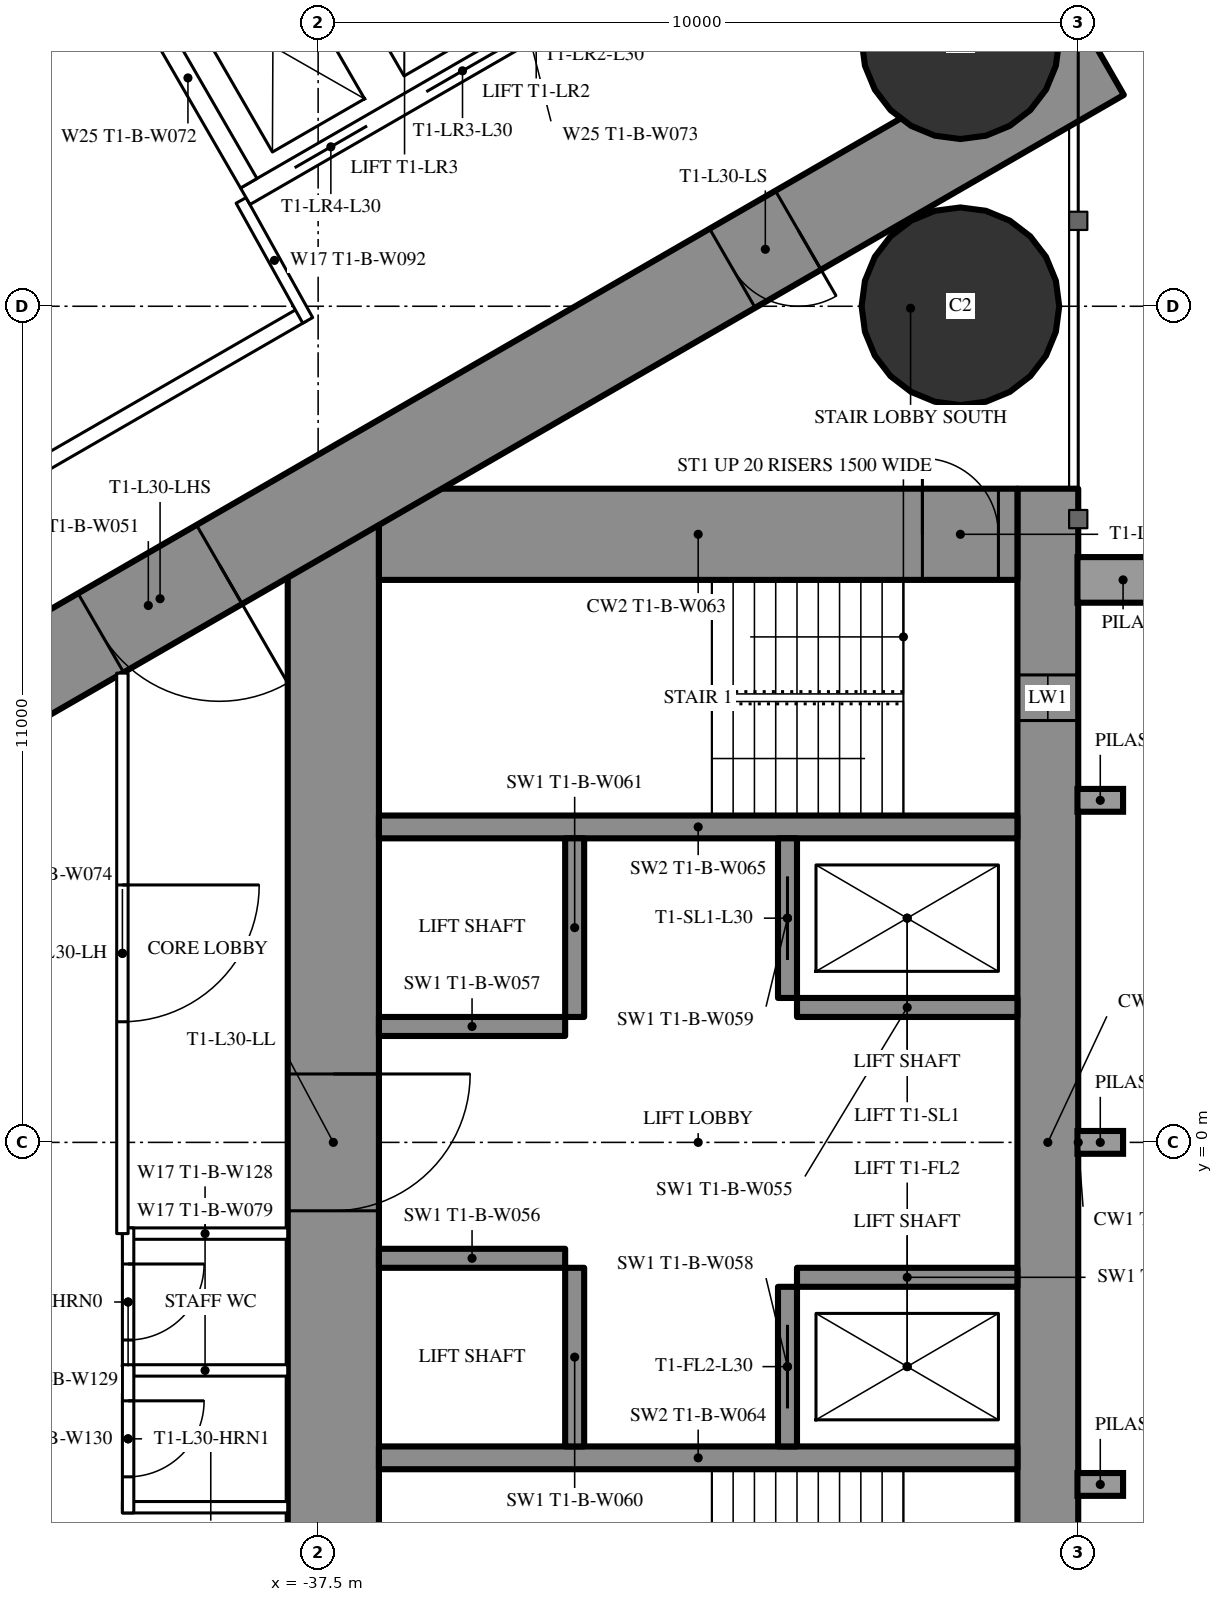
"""IFC4 building model, lengths in metres.
Left out: names, types, materials, properties, quantities, classifications, styles, units other than length and angle.
Written with IfcOpenShell. Run it as: python <this file> out.ifc"""

import sys

from ifc_helpers import new_model, si_unit, direction, frame, frame_2d, origin, origin_2d, place, context, subcontext, project, spatial, rectangle, hollow_circle, extrude, element, fill, save


model = new_model("IFC4")
c1 = context("Model", 3, precision=1e-05, world=origin(), true_north=direction((0.0, 1.0)))
c2 = subcontext(c1, "Body", "Model", "MODEL_VIEW")
j1 = project(units=[si_unit("LENGTHUNIT", "METRE"), si_unit("PLANEANGLEUNIT", "RADIAN")], contexts=[c1])
p1 = place(None, origin())
s1 = spatial("IfcSite", under=j1, at=p1, CompositionType="ELEMENT")
p2 = place(p1, origin())
s2 = spatial("IfcBuilding", under=s1, at=p2, CompositionType="ELEMENT")
p3 = place(p2, frame((0.0, 0.0, 115.1)))
s3 = spatial("IfcBuildingStorey", under=s2, at=p3, CompositionType="ELEMENT", Elevation=115.1)
for number, where, z_axis, x_axis in (
    (1, (-29.05, 11.0, 0.0), (0.0, 0.0, 1.0), (1.0, 0.0, 0.0)),
    (2, (-29.05, 14.5, 0.0), (0.0, 0.0, 1.0), (1.0, 0.0, 0.0)),
):
    element("IfcColumn", number, at=place(p3, frame(where, z_axis=z_axis, x_axis=x_axis)), inside=s3, PredefinedType="COLUMN", context=c2, shape_type="SweptSolid", body=[
        extrude(hollow_circle(Radius=1.3, WallThickness=0.1, at=origin_2d()), origin(), (0.0, 0.0, 1.0), 3.5),
    ])
p4 = place(p3, frame((-27.9, 8.6, 0.0), z_axis=(0.0, 0.0, 1.0), x_axis=(0.0, -1.0, 0.0)))
e3 = element("IfcWall", 3, at=p4, inside=s3, PredefinedType="SHEAR", context=c2, shape_type="SweptSolid", body=[
    extrude(rectangle(XDim=17.2, YDim=0.8, at=frame_2d((8.6, 0.0))), origin(), (0.0, 0.0, 1.0), 3.5),
])
p5 = place(p4, frame((2.45, 0.0, 0.6)))
e4 = element("IfcOpeningElement", 4, at=p5, cuts=e3, PredefinedType="OPENING", context=c2, shape_type="SweptSolid", body=[
    extrude(rectangle(XDim=0.6, YDim=2.1, at=frame_2d((0.3, 1.05))), frame((0.0, 0.41, 0.0), z_axis=(0.0, -1.0, 0.0), x_axis=(1.0, 0.0, 0.0)), (0.0, 0.0, 1.0), 0.82),
])
p6 = place(p4, frame((14.15, 0.0, 0.6)))
e5 = element("IfcOpeningElement", 5, at=p6, cuts=e3, PredefinedType="OPENING", context=c2, shape_type="SweptSolid", body=[
    extrude(rectangle(XDim=0.6, YDim=2.1, at=frame_2d((0.3, 1.05))), frame((0.0, 0.41, 0.0), z_axis=(0.0, -1.0, 0.0), x_axis=(1.0, 0.0, 0.0)), (0.0, 0.0, 1.0), 0.82),
])
p7 = place(p3, frame((-37.3, 8.6, 0.0), z_axis=(0.0, 0.0, 1.0), x_axis=(0.0, -1.0, 0.0)))
e6 = element("IfcWall", 6, at=p7, inside=s3, PredefinedType="SHEAR", context=c2, shape_type="SweptSolid", body=[
    extrude(rectangle(XDim=17.2, YDim=1.2, at=frame_2d((8.6, 0.0))), origin(), (0.0, 0.0, 1.0), 3.5),
])
p8 = place(p7, frame((7.7, 0.0, 0.0)))
e7 = element("IfcOpeningElement", 7, at=p8, cuts=e6, PredefinedType="OPENING", context=c2, shape_type="SweptSolid", body=[
    extrude(rectangle(XDim=1.8, YDim=2.2, at=frame_2d((0.9, 1.1))), frame((0.0, 0.61, 0.0), z_axis=(0.0, -1.0, 0.0), x_axis=(1.0, 0.0, 0.0)), (0.0, 0.0, 1.0), 1.22),
])
p9 = place(p3, frame((-28.3, 8.0, 0.0), z_axis=(0.0, 0.0, 1.0), x_axis=(-1.0, 0.0, 0.0)))
e8 = element("IfcWall", 8, at=p9, inside=s3, PredefinedType="SHEAR", context=c2, shape_type="SweptSolid", body=[
    extrude(rectangle(XDim=8.4, YDim=1.2, at=frame_2d((4.2, 0.0))), origin(), (0.0, 0.0, 1.0), 3.5),
])
p10 = place(p9, frame((0.25, 0.0, 0.0)))
e9 = element("IfcOpeningElement", 9, at=p10, cuts=e8, PredefinedType="OPENING", context=c2, shape_type="SweptSolid", body=[
    extrude(rectangle(XDim=1.0, YDim=2.2, at=frame_2d((0.5, 1.1))), frame((0.0, 0.61, 0.0), z_axis=(0.0, -1.0, 0.0), x_axis=(1.0, 0.0, 0.0)), (0.0, 0.0, 1.0), 1.22),
])
for number, where, z_axis, x_axis in (
    (10, (-28.3, 4.15, 0.0), (0.0, 0.0, 1.0), (-1.0, 0.0, 0.0)),
    (11, (-28.3, -4.15, 0.0), (0.0, 0.0, 1.0), (-1.0, 0.0, 0.0)),
):
    element("IfcWall", number, at=place(p3, frame(where, z_axis=z_axis, x_axis=x_axis)), inside=s3, PredefinedType="SHEAR", context=c2, shape_type="SweptSolid", body=[
        extrude(rectangle(XDim=8.4, YDim=0.3, at=frame_2d((4.2, 0.0))), origin(), (0.0, 0.0, 1.0), 3.5),
    ])
p11 = place(p3, frame((-31.325, 4.0, 0.0), z_axis=(0.0, 0.0, 1.0), x_axis=(0.0, -1.0, 0.0)))
e12 = element("IfcWall", 12, at=p11, inside=s3, PredefinedType="SHEAR", context=c2, shape_type="SweptSolid", body=[
    extrude(rectangle(XDim=2.1, YDim=0.25, at=frame_2d((1.05, 0.0))), origin(), (0.0, 0.0, 1.0), 3.5),
])
p12 = place(p11, frame((0.5, 0.0, 0.0)))
e13 = element("IfcOpeningElement", 13, at=p12, cuts=e12, PredefinedType="OPENING", context=c2, shape_type="SweptSolid", body=[
    extrude(rectangle(XDim=1.1, YDim=2.2, at=frame_2d((0.55, 1.1))), frame((0.0, 0.135, 0.0), z_axis=(0.0, -1.0, 0.0), x_axis=(1.0, 0.0, 0.0)), (0.0, 0.0, 1.0), 0.27),
])
p13 = place(p3, frame((-34.125, 4.0, 0.0), z_axis=(0.0, 0.0, 1.0), x_axis=(0.0, -1.0, 0.0)))
e14 = element("IfcWall", 14, at=p13, inside=s3, PredefinedType="SHEAR", context=c2, shape_type="SweptSolid", body=[
    extrude(rectangle(XDim=2.35, YDim=0.25, at=frame_2d((1.175, 0.0))), origin(), (0.0, 0.0, 1.0), 3.5),
])
p14 = place(p3, frame((-28.3, 1.775, 0.0), z_axis=(0.0, 0.0, 1.0), x_axis=(-1.0, 0.0, 0.0)))
e15 = element("IfcWall", 15, at=p14, inside=s3, PredefinedType="SHEAR", context=c2, shape_type="SweptSolid", body=[
    extrude(rectangle(XDim=2.9, YDim=0.25, at=frame_2d((1.45, 0.0))), origin(), (0.0, 0.0, 1.0), 3.5),
])
p15 = place(p3, frame((-34.25, 1.525, 0.0), z_axis=(0.0, 0.0, 1.0), x_axis=(-1.0, 0.0, 0.0)))
e16 = element("IfcWall", 16, at=p15, inside=s3, PredefinedType="SHEAR", context=c2, shape_type="SweptSolid", body=[
    extrude(rectangle(XDim=2.45, YDim=0.25, at=frame_2d((1.225, 0.0))), origin(), (0.0, 0.0, 1.0), 3.5),
])
p16 = place(p3, frame((-31.325, -1.9, 0.0), z_axis=(0.0, 0.0, 1.0), x_axis=(0.0, -1.0, 0.0)))
e17 = element("IfcWall", 17, at=p16, inside=s3, PredefinedType="SHEAR", context=c2, shape_type="SweptSolid", body=[
    extrude(rectangle(XDim=2.1, YDim=0.25, at=frame_2d((1.05, 0.0))), origin(), (0.0, 0.0, 1.0), 3.5),
])
p17 = place(p16, frame((0.5, 0.0, 0.0)))
e18 = element("IfcOpeningElement", 18, at=p17, cuts=e17, PredefinedType="OPENING", context=c2, shape_type="SweptSolid", body=[
    extrude(rectangle(XDim=1.1, YDim=2.2, at=frame_2d((0.55, 1.1))), frame((0.0, 0.135, 0.0), z_axis=(0.0, -1.0, 0.0), x_axis=(1.0, 0.0, 0.0)), (0.0, 0.0, 1.0), 0.27),
])
p18 = place(p3, frame((-34.125, -1.65, 0.0), z_axis=(0.0, 0.0, 1.0), x_axis=(0.0, -1.0, 0.0)))
e19 = element("IfcWall", 19, at=p18, inside=s3, PredefinedType="SHEAR", context=c2, shape_type="SweptSolid", body=[
    extrude(rectangle(XDim=2.35, YDim=0.25, at=frame_2d((1.175, 0.0))), origin(), (0.0, 0.0, 1.0), 3.5),
])
p19 = place(p3, frame((-28.3, -1.775, 0.0), z_axis=(0.0, 0.0, 1.0), x_axis=(-1.0, 0.0, 0.0)))
e20 = element("IfcWall", 20, at=p19, inside=s3, PredefinedType="SHEAR", context=c2, shape_type="SweptSolid", body=[
    extrude(rectangle(XDim=2.9, YDim=0.25, at=frame_2d((1.45, 0.0))), origin(), (0.0, 0.0, 1.0), 3.5),
])
p20 = place(p3, frame((-34.25, -1.525, 0.0), z_axis=(0.0, 0.0, 1.0), x_axis=(-1.0, 0.0, 0.0)))
e21 = element("IfcWall", 21, at=p20, inside=s3, PredefinedType="SHEAR", context=c2, shape_type="SweptSolid", body=[
    extrude(rectangle(XDim=2.45, YDim=0.25, at=frame_2d((1.225, 0.0))), origin(), (0.0, 0.0, 1.0), 3.5),
])
p21 = place(p3, frame((-27.2, 14.3, 0.0), z_axis=(0.0, 0.0, 1.0), x_axis=(-0.866026593062, -0.499997940104, 0.0)))
e22 = element("IfcWall", 22, at=p21, inside=s3, PredefinedType="SHEAR", context=c2, shape_type="SweptSolid", body=[
    extrude(rectangle(XDim=28.946, YDim=1.2, at=frame_2d((14.473, 0.0))), origin(), (0.0, 0.0, 1.0), 3.5),
])
p22 = place(p21, frame((4.6, 0.0, 0.0)))
e23 = element("IfcOpeningElement", 23, at=p22, cuts=e22, PredefinedType="OPENING", context=c2, shape_type="SweptSolid", body=[
    extrude(rectangle(XDim=1.0, YDim=2.2, at=frame_2d((0.5, 1.1))), frame((0.0, 0.61, 0.0), z_axis=(0.0, -1.0, 0.0), x_axis=(1.0, 0.0, 0.0)), (0.0, 0.0, 1.0), 1.22),
])
p23 = place(p21, frame((13.395, 0.0, 0.0)))
e24 = element("IfcOpeningElement", 24, at=p23, cuts=e22, PredefinedType="OPENING", context=c2, shape_type="SweptSolid", body=[
    extrude(rectangle(XDim=1.8, YDim=2.2, at=frame_2d((0.9, 1.1))), frame((0.0, 0.61, 0.0), z_axis=(0.0, -1.0, 0.0), x_axis=(1.0, 0.0, 0.0)), (0.0, 0.0, 1.0), 1.22),
])
p24 = place(p3, frame((-27.2, -14.3, 0.0), z_axis=(0.0, 0.0, 1.0), x_axis=(-0.866024021859, 0.500002393557, 0.0)))
e25 = element("IfcWall", 25, at=p24, inside=s3, PredefinedType="SHEAR", context=c2, shape_type="SweptSolid", body=[
    extrude(rectangle(XDim=27.907, YDim=1.2, at=frame_2d((13.954, 0.0))), origin(), (0.0, 0.0, 1.0), 3.5),
])
p25 = place(p24, frame((4.6, 0.0, 0.0)))
e26 = element("IfcOpeningElement", 26, at=p25, cuts=e25, PredefinedType="OPENING", context=c2, shape_type="SweptSolid", body=[
    extrude(rectangle(XDim=1.0, YDim=2.2, at=frame_2d((0.5, 1.1))), frame((0.0, 0.61, 0.0), z_axis=(0.0, -1.0, 0.0), x_axis=(1.0, 0.0, 0.0)), (0.0, 0.0, 1.0), 1.22),
])
p26 = place(p24, frame((13.395, 0.0, 0.0)))
e27 = element("IfcOpeningElement", 27, at=p26, cuts=e25, PredefinedType="OPENING", context=c2, shape_type="SweptSolid", body=[
    extrude(rectangle(XDim=1.8, YDim=2.2, at=frame_2d((0.9, 1.1))), frame((0.0, 0.61, 0.0), z_axis=(0.0, -1.0, 0.0), x_axis=(1.0, 0.0, 0.0)), (0.0, 0.0, 1.0), 1.22),
])
p27 = place(p3, frame((-37.7, 10.894, 0.0), z_axis=(0.0, 0.0, 1.0), x_axis=(-0.866027905338, -0.499995667157, 0.0)))
e28 = element("IfcWall", 28, at=p27, inside=s3, PredefinedType="PARTITIONING", context=c2, shape_type="SweptSolid", body=[
    extrude(rectangle(XDim=21.787, YDim=0.2, at=frame_2d((10.894, 0.0))), origin(), (0.0, 0.0, 1.0), 3.25),
])
p28 = place(p27, frame((11.23, 0.0, 0.0)))
e29 = element("IfcOpeningElement", 29, at=p28, cuts=e28, PredefinedType="OPENING", context=c2, shape_type="SweptSolid", body=[
    extrude(rectangle(XDim=0.95, YDim=2.2, at=frame_2d((0.475, 1.1))), frame((0.0, 0.11, 0.0), z_axis=(0.0, -1.0, 0.0), x_axis=(1.0, 0.0, 0.0)), (0.0, 0.0, 1.0), 0.22),
])
p29 = place(p27, frame((9.531, 0.0, 0.0)))
e30 = element("IfcOpeningElement", 30, at=p29, cuts=e28, PredefinedType="OPENING", context=c2, shape_type="SweptSolid", body=[
    extrude(rectangle(XDim=0.95, YDim=2.2, at=frame_2d((0.475, 1.1))), frame((0.0, 0.11, 0.0), z_axis=(0.0, -1.0, 0.0), x_axis=(1.0, 0.0, 0.0)), (0.0, 0.0, 1.0), 0.22),
])
p30 = place(p3, frame((-38.513, 12.392, 0.0), z_axis=(0.0, 0.0, 1.0), x_axis=(0.485585508183, -0.874189175317, 0.0)))
e31 = element("IfcWall", 31, at=p30, inside=s3, PredefinedType="PARTITIONING", context=c2, shape_type="SweptSolid", body=[
    extrude(rectangle(XDim=1.805, YDim=0.15, at=frame_2d((0.902, 0.0))), origin(), (0.0, 0.0, 1.0), 3.25),
])
for number, where, z_axis, x_axis in (
    (32, (-37.9, -1.2, 0.0), (0.0, 0.0, 1.0), (-1.0, 0.0, 0.0)),
    (33, (-37.9, -3.0, 0.0), (0.0, 0.0, 1.0), (-1.0, 0.0, 0.0)),
    (34, (-37.9, -4.8, 0.0), (0.0, 0.0, 1.0), (-1.0, 0.0, 0.0)),
):
    element("IfcWall", number, at=place(p3, frame(where, z_axis=z_axis, x_axis=x_axis)), inside=s3, PredefinedType="PARTITIONING", context=c2, shape_type="SweptSolid", body=[
        extrude(rectangle(XDim=2.175, YDim=0.15, at=frame_2d((1.087, 0.0))), origin(), (0.0, 0.0, 1.0), 3.25),
    ])
p31 = place(p3, frame((-40.0, -1.125, 0.0), z_axis=(0.0, 0.0, 1.0), x_axis=(0.0, -1.0, 0.0)))
e35 = element("IfcWall", 35, at=p31, inside=s3, PredefinedType="PARTITIONING", context=c2, shape_type="SweptSolid", body=[
    extrude(rectangle(XDim=1.95, YDim=0.15, at=frame_2d((0.975, 0.0))), origin(), (0.0, 0.0, 1.0), 3.25),
])
p32 = place(p31, frame((0.475, 0.0, 0.0)))
e36 = element("IfcOpeningElement", 36, at=p32, cuts=e35, PredefinedType="OPENING", context=c2, shape_type="SweptSolid", body=[
    extrude(rectangle(XDim=1.0, YDim=2.2, at=frame_2d((0.5, 1.1))), frame((0.0, 0.085, 0.0), z_axis=(0.0, -1.0, 0.0), x_axis=(1.0, 0.0, 0.0)), (0.0, 0.0, 1.0), 0.17),
])
p33 = place(p3, frame((-40.0, -2.925, 0.0), z_axis=(0.0, 0.0, 1.0), x_axis=(0.0, -1.0, 0.0)))
e37 = element("IfcWall", 37, at=p33, inside=s3, PredefinedType="PARTITIONING", context=c2, shape_type="SweptSolid", body=[
    extrude(rectangle(XDim=1.95, YDim=0.15, at=frame_2d((0.975, 0.0))), origin(), (0.0, 0.0, 1.0), 3.25),
])
p34 = place(p33, frame((0.475, 0.0, 0.0)))
e38 = element("IfcOpeningElement", 38, at=p34, cuts=e37, PredefinedType="OPENING", context=c2, shape_type="SweptSolid", body=[
    extrude(rectangle(XDim=1.0, YDim=2.2, at=frame_2d((0.5, 1.1))), frame((0.0, 0.085, 0.0), z_axis=(0.0, -1.0, 0.0), x_axis=(1.0, 0.0, 0.0)), (0.0, 0.0, 1.0), 0.17),
])
p35 = place(p3, frame((-40.075, 6.174, 0.0), z_axis=(0.0, 0.0, 1.0), x_axis=(0.0, -1.0, 0.0)))
e39 = element("IfcWall", 39, at=p35, inside=s3, PredefinedType="PARTITIONING", context=c2, shape_type="SweptSolid", body=[
    extrude(rectangle(XDim=7.374, YDim=0.15, at=frame_2d((3.687, 0.0))), origin(), (0.0, 0.0, 1.0), 3.25),
])
p36 = place(p35, frame((2.787, 0.0, 0.0)))
e40 = element("IfcOpeningElement", 40, at=p36, cuts=e39, PredefinedType="OPENING", context=c2, shape_type="SweptSolid", body=[
    extrude(rectangle(XDim=1.8, YDim=2.2, at=frame_2d((0.9, 1.1))), frame((0.0, 0.085, 0.0), z_axis=(0.0, -1.0, 0.0), x_axis=(1.0, 0.0, 0.0)), (0.0, 0.0, 1.0), 0.17),
])
p37 = place(p3, frame((-31.01, 16.747, 0.0), z_axis=(0.0, 0.0, 1.0), x_axis=(-0.866028165386, -0.499995216735, 0.0)))
e41 = element("IfcWall", 41, at=p37, inside=s3, PredefinedType="PARTITIONING", context=c2, shape_type="SweptSolid", body=[
    extrude(rectangle(XDim=8.6, YDim=0.25, at=frame_2d((4.3, 0.0))), origin(), (0.0, 0.0, 1.0), 3.25),
])
p38 = place(p37, frame((0.75, 0.0, 0.0)))
e42 = element("IfcOpeningElement", 42, at=p38, cuts=e41, PredefinedType="OPENING", context=c2, shape_type="SweptSolid", body=[
    extrude(rectangle(XDim=1.1, YDim=2.2, at=frame_2d((0.55, 1.1))), frame((0.0, 0.135, 0.0), z_axis=(0.0, -1.0, 0.0), x_axis=(1.0, 0.0, 0.0)), (0.0, 0.0, 1.0), 0.27),
])
p39 = place(p37, frame((2.75, 0.0, 0.0)))
e43 = element("IfcOpeningElement", 43, at=p39, cuts=e41, PredefinedType="OPENING", context=c2, shape_type="SweptSolid", body=[
    extrude(rectangle(XDim=1.1, YDim=2.2, at=frame_2d((0.55, 1.1))), frame((0.0, 0.135, 0.0), z_axis=(0.0, -1.0, 0.0), x_axis=(1.0, 0.0, 0.0)), (0.0, 0.0, 1.0), 0.27),
])
p40 = place(p37, frame((4.75, 0.0, 0.0)))
e44 = element("IfcOpeningElement", 44, at=p40, cuts=e41, PredefinedType="OPENING", context=c2, shape_type="SweptSolid", body=[
    extrude(rectangle(XDim=1.1, YDim=2.2, at=frame_2d((0.55, 1.1))), frame((0.0, 0.135, 0.0), z_axis=(0.0, -1.0, 0.0), x_axis=(1.0, 0.0, 0.0)), (0.0, 0.0, 1.0), 0.27),
])
p41 = place(p37, frame((6.75, 0.0, 0.0)))
e45 = element("IfcOpeningElement", 45, at=p41, cuts=e41, PredefinedType="OPENING", context=c2, shape_type="SweptSolid", body=[
    extrude(rectangle(XDim=1.1, YDim=2.2, at=frame_2d((0.55, 1.1))), frame((0.0, 0.135, 0.0), z_axis=(0.0, -1.0, 0.0), x_axis=(1.0, 0.0, 0.0)), (0.0, 0.0, 1.0), 0.27),
])
p42 = place(p3, frame((-38.413, 12.618, 0.0), z_axis=(0.0, 0.0, 1.0), x_axis=(-0.499872130319, 0.866099216793, 0.0)))
e46 = element("IfcWall", 46, at=p42, inside=s3, PredefinedType="PARTITIONING", context=c2, shape_type="SweptSolid", body=[
    extrude(rectangle(XDim=3.2, YDim=0.25, at=frame_2d((1.6, 0.0))), origin(), (0.0, 0.0, 1.0), 3.25),
])
p43 = place(p32, origin())
e47 = element("IfcDoor", 47, at=p43, inside=s3, OperationType="SINGLE_SWING_LEFT", PredefinedType="DOOR", context=c2, shape_type="SweptSolid", body=[
    extrude(rectangle(XDim=1.0, YDim=2.2, at=frame_2d((0.5, 1.1))), frame((0.0, 0.025, 0.0), z_axis=(0.0, -1.0, 0.0), x_axis=(1.0, 0.0, 0.0)), (0.0, 0.0, 1.0), 0.05),
])
fill(e36, e47)
p44 = place(p34, origin())
e48 = element("IfcDoor", 48, at=p44, inside=s3, OperationType="SINGLE_SWING_LEFT", PredefinedType="DOOR", context=c2, shape_type="SweptSolid", body=[
    extrude(rectangle(XDim=1.0, YDim=2.2, at=frame_2d((0.5, 1.1))), frame((0.0, 0.025, 0.0), z_axis=(0.0, -1.0, 0.0), x_axis=(1.0, 0.0, 0.0)), (0.0, 0.0, 1.0), 0.05),
])
fill(e38, e48)
p45 = place(p36, origin())
e49 = element("IfcDoor", 49, at=p45, inside=s3, OperationType="DOUBLE_DOOR_SINGLE_SWING", PredefinedType="DOOR", context=c2, shape_type="SweptSolid", body=[
    extrude(rectangle(XDim=1.8, YDim=2.2, at=frame_2d((0.9, 1.1))), frame((0.0, 0.025, 0.0), z_axis=(0.0, -1.0, 0.0), x_axis=(1.0, 0.0, 0.0)), (0.0, 0.0, 1.0), 0.05),
])
fill(e40, e49)
p46 = place(p22, origin())
e50 = element("IfcDoor", 50, at=p46, inside=s3, OperationType="SINGLE_SWING_LEFT", PredefinedType="DOOR", context=c2, shape_type="SweptSolid", body=[
    extrude(rectangle(XDim=1.0, YDim=2.2, at=frame_2d((0.5, 1.1))), frame((0.0, 0.025, 0.0), z_axis=(0.0, -1.0, 0.0), x_axis=(1.0, 0.0, 0.0)), (0.0, 0.0, 1.0), 0.05),
])
fill(e23, e50)
p47 = place(p23, origin())
e51 = element("IfcDoor", 51, at=p47, inside=s3, OperationType="DOUBLE_DOOR_SINGLE_SWING", PredefinedType="DOOR", context=c2, shape_type="SweptSolid", body=[
    extrude(rectangle(XDim=1.8, YDim=2.2, at=frame_2d((0.9, 1.1))), frame((0.0, 0.025, 0.0), z_axis=(0.0, -1.0, 0.0), x_axis=(1.0, 0.0, 0.0)), (0.0, 0.0, 1.0), 0.05),
])
fill(e24, e51)
p48 = place(p8, origin())
e52 = element("IfcDoor", 52, at=p48, inside=s3, OperationType="DOUBLE_DOOR_SINGLE_SWING", PredefinedType="DOOR", context=c2, shape_type="SweptSolid", body=[
    extrude(rectangle(XDim=1.8, YDim=2.2, at=frame_2d((0.9, 1.1))), frame((0.0, 0.025, 0.0), z_axis=(0.0, -1.0, 0.0), x_axis=(1.0, 0.0, 0.0)), (0.0, 0.0, 1.0), 0.05),
])
fill(e7, e52)
p49 = place(p10, origin())
e53 = element("IfcDoor", 53, at=p49, inside=s3, OperationType="SINGLE_SWING_RIGHT", PredefinedType="DOOR", context=c2, shape_type="SweptSolid", body=[
    extrude(rectangle(XDim=1.0, YDim=2.2, at=frame_2d((0.5, 1.1))), frame((0.0, 0.025, 0.0), z_axis=(0.0, -1.0, 0.0), x_axis=(1.0, 0.0, 0.0)), (0.0, 0.0, 1.0), 0.05),
])
fill(e9, e53)
p50 = place(p12, origin())
e54 = element("IfcDoor", 54, at=p50, inside=s3, OperationType="SLIDING_TO_LEFT", PredefinedType="USERDEFINED", context=c2, shape_type="SweptSolid", body=[
    extrude(rectangle(XDim=1.1, YDim=2.2, at=frame_2d((0.55, 1.1))), frame((0.0, 0.025, 0.0), z_axis=(0.0, -1.0, 0.0), x_axis=(1.0, 0.0, 0.0)), (0.0, 0.0, 1.0), 0.05),
])
fill(e13, e54)
p51 = place(p17, origin())
e55 = element("IfcDoor", 55, at=p51, inside=s3, OperationType="SLIDING_TO_LEFT", PredefinedType="USERDEFINED", context=c2, shape_type="SweptSolid", body=[
    extrude(rectangle(XDim=1.1, YDim=2.2, at=frame_2d((0.55, 1.1))), frame((0.0, 0.025, 0.0), z_axis=(0.0, -1.0, 0.0), x_axis=(1.0, 0.0, 0.0)), (0.0, 0.0, 1.0), 0.05),
])
fill(e18, e55)
p52 = place(p40, origin())
e56 = element("IfcDoor", 56, at=p52, inside=s3, OperationType="DOUBLE_DOOR_SLIDING", PredefinedType="USERDEFINED", context=c2, shape_type="SweptSolid", body=[
    extrude(rectangle(XDim=1.1, YDim=2.2, at=frame_2d((0.55, 1.1))), frame((0.0, 0.025, 0.0), z_axis=(0.0, -1.0, 0.0), x_axis=(1.0, 0.0, 0.0)), (0.0, 0.0, 1.0), 0.05),
])
fill(e44, e56)
p53 = place(p41, origin())
e57 = element("IfcDoor", 57, at=p53, inside=s3, OperationType="DOUBLE_DOOR_SLIDING", PredefinedType="USERDEFINED", context=c2, shape_type="SweptSolid", body=[
    extrude(rectangle(XDim=1.1, YDim=2.2, at=frame_2d((0.55, 1.1))), frame((0.0, 0.025, 0.0), z_axis=(0.0, -1.0, 0.0), x_axis=(1.0, 0.0, 0.0)), (0.0, 0.0, 1.0), 0.05),
])
fill(e45, e57)
p54 = place(p5, origin())
e58 = element("IfcWindow", 58, at=p54, inside=s3, PartitioningType="SINGLE_PANEL", PredefinedType="WINDOW", context=c2, shape_type="SweptSolid", body=[
    extrude(rectangle(XDim=0.6, YDim=2.1, at=frame_2d((0.3, 1.05))), frame((0.0, 0.03, 0.0), z_axis=(0.0, -1.0, 0.0), x_axis=(1.0, 0.0, 0.0)), (0.0, 0.0, 1.0), 0.06),
])
fill(e4, e58)
save(model, sys.argv[1])
